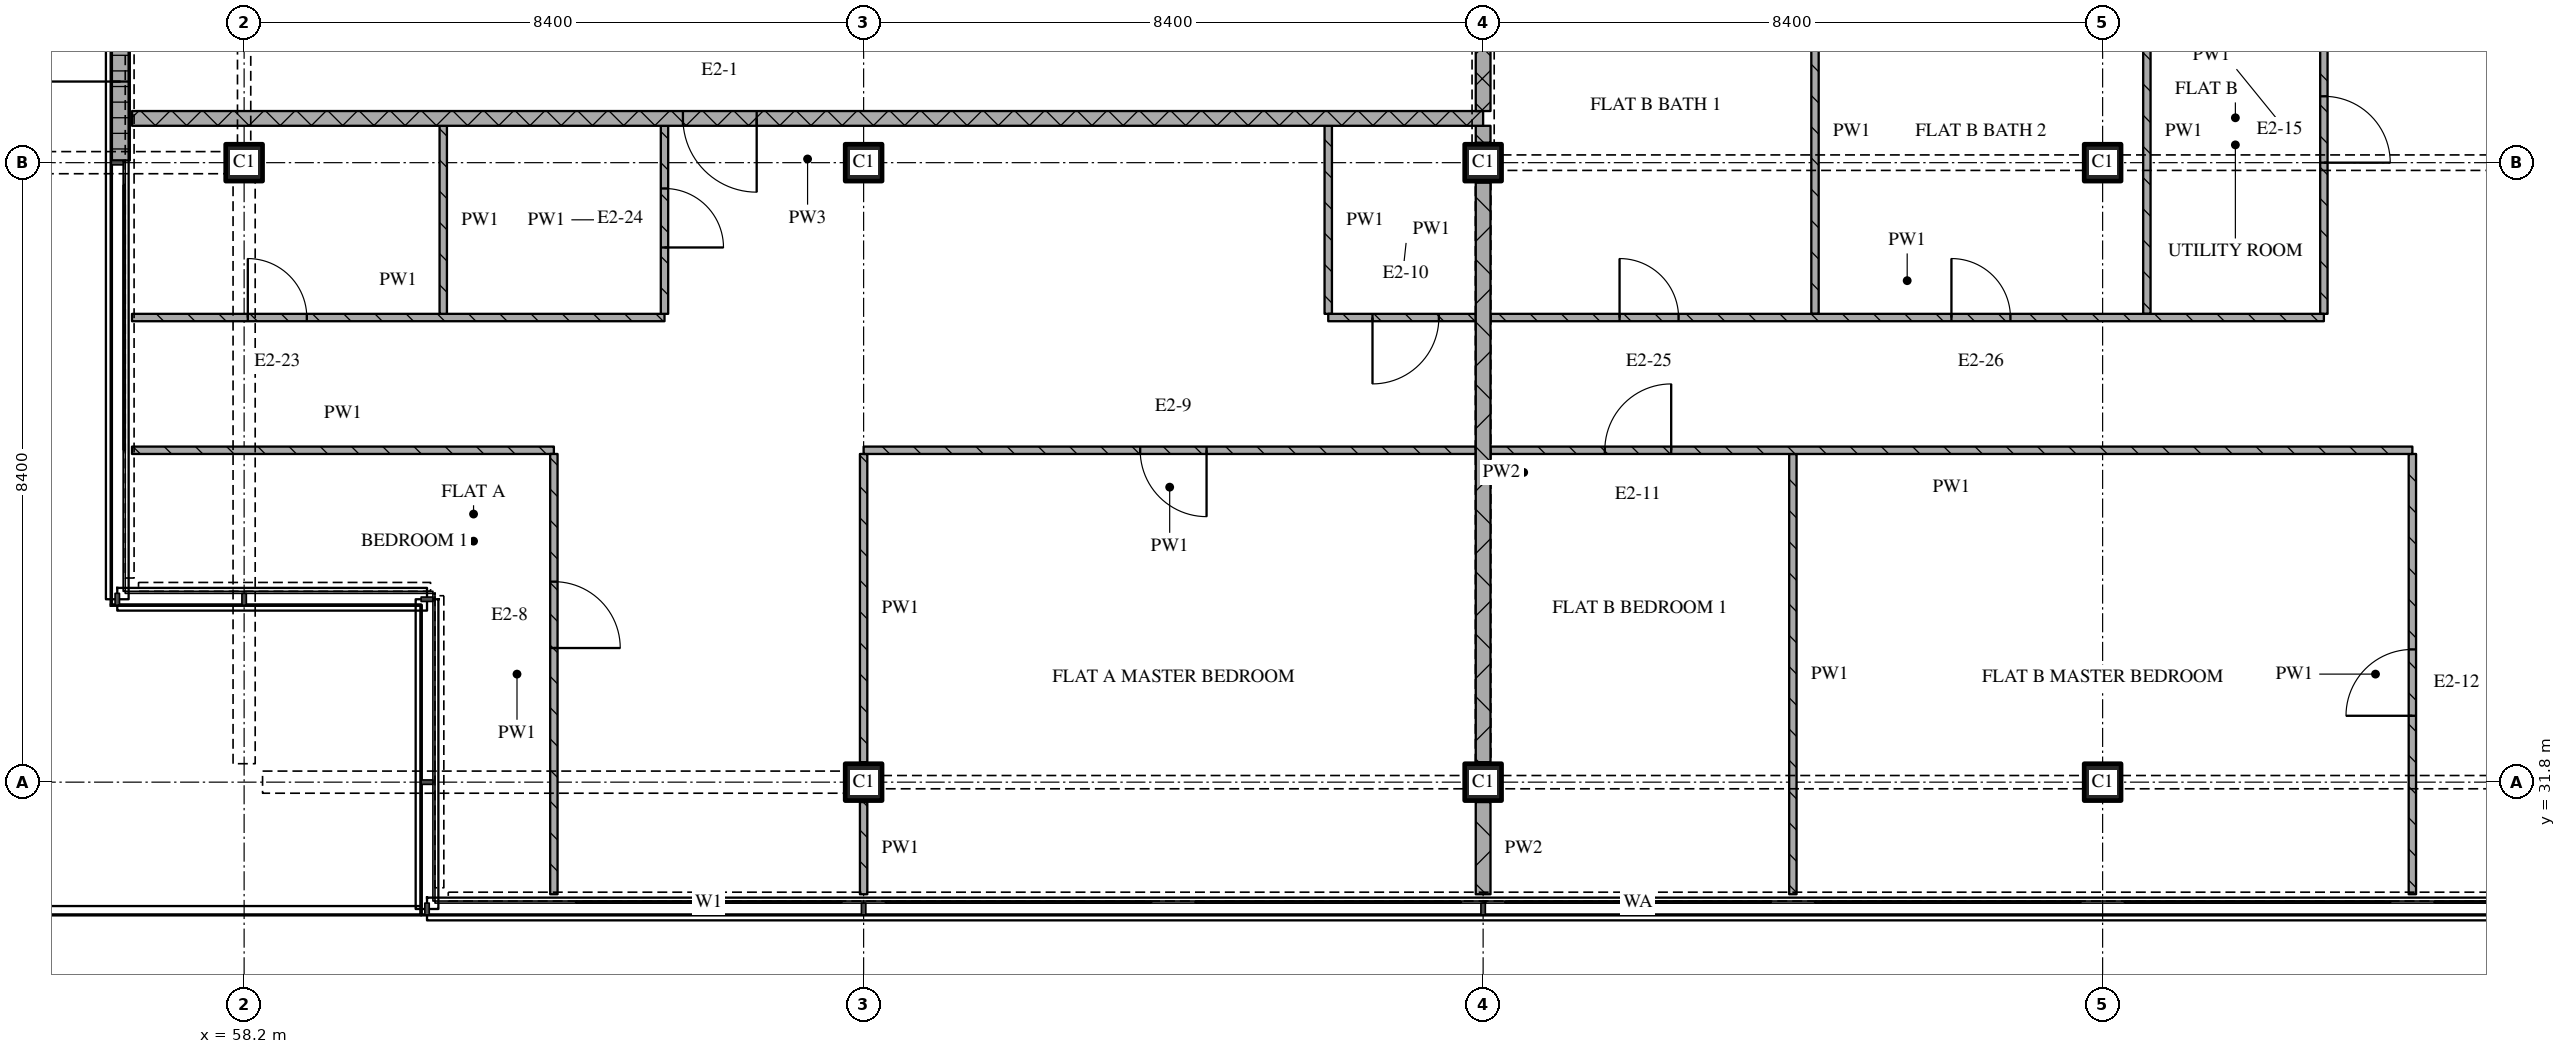
"""IFC4 building model, lengths in metres.
Left out: names, types, materials, properties, quantities, classifications, styles, units other than length and angle.
Written with IfcOpenShell. Run it as: python <this file> out.ifc"""

import sys

from ifc_helpers import new_model, si_unit, direction, frame, frame_2d, origin, origin_2d, place, context, subcontext, project, spatial, rectangle, extrude, element, fill, save


model = new_model("IFC4")
c1 = context("Model", 3, precision=1e-05, world=origin(), true_north=direction((0.0, 1.0)))
c2 = subcontext(c1, "Body", "Model", "MODEL_VIEW")
j1 = project(units=[si_unit("LENGTHUNIT", "METRE"), si_unit("PLANEANGLEUNIT", "RADIAN")], contexts=[c1])
p1 = place(None, origin())
s1 = spatial("IfcSite", under=j1, at=p1, CompositionType="ELEMENT")
p2 = place(p1, origin())
s2 = spatial("IfcBuilding", under=s1, at=p2, CompositionType="ELEMENT")
p3 = place(p2, frame((0.0, 0.0, 270.75)))
s3 = spatial("IfcBuildingStorey", under=s2, at=p3, CompositionType="ELEMENT", Elevation=270.75)
for number, where, z_axis, x_axis in (
    (1, (58.2, 40.2, 0.0), (0.0, 0.0, 1.0), (1.0, 0.0, 0.0)),
    (2, (66.6, 31.8, 0.0), (0.0, 0.0, 1.0), (1.0, 0.0, 0.0)),
    (3, (66.6, 40.2, 0.0), (0.0, 0.0, 1.0), (1.0, 0.0, 0.0)),
    (4, (75.0, 31.8, 0.0), (0.0, 0.0, 1.0), (1.0, 0.0, 0.0)),
    (5, (75.0, 40.2, 0.0), (0.0, 0.0, 1.0), (1.0, 0.0, 0.0)),
    (6, (83.4, 31.8, 0.0), (0.0, 0.0, 1.0), (1.0, 0.0, 0.0)),
    (7, (83.4, 40.2, 0.0), (0.0, 0.0, 1.0), (1.0, 0.0, 0.0)),
):
    element("IfcColumn", number, at=place(p3, frame(where, z_axis=z_axis, x_axis=x_axis)), inside=s3, PredefinedType="COLUMN", context=c2, shape_type="SweptSolid", body=[
        extrude(rectangle(XDim=0.5, YDim=0.5, at=origin_2d()), origin(), (0.0, 0.0, 1.0), 3.6),
    ])
p4 = place(p3, frame((56.525, 40.23, 0.0), z_axis=(0.0, 0.0, 1.0), x_axis=(0.0, 1.0, 0.0)))
e8 = element("IfcWall", 8, at=p4, inside=s3, PredefinedType="SOLIDWALL", context=c2, shape_type="SweptSolid", body=[
    extrude(rectangle(XDim=4.14, YDim=0.25, at=frame_2d((2.07, 0.0))), origin(), (0.0, 0.0, 1.0), 3.32),
])
p5 = place(p4, frame((1.07, 0.0, 0.0)))
e9 = element("IfcOpeningElement", 9, at=p5, cuts=e8, PredefinedType="OPENING", context=c2, shape_type="SweptSolid", body=[
    extrude(rectangle(XDim=2.0, YDim=2.4, at=frame_2d((1.0, 1.2))), frame((0.0, 0.135, 0.0), z_axis=(0.0, -1.0, 0.0), x_axis=(1.0, 0.0, 0.0)), (0.0, 0.0, 1.0), 0.27),
])
p6 = place(p3, frame((56.68, 36.3, 0.0), z_axis=(0.0, 0.0, 1.0), x_axis=(1.0, 0.0, 0.0)))
e10 = element("IfcWall", 10, at=p6, inside=s3, PredefinedType="PARTITIONING", context=c2, shape_type="SweptSolid", body=[
    extrude(rectangle(XDim=5.72, YDim=0.1, at=frame_2d((2.86, 0.0))), origin(), (0.0, 0.0, 1.0), 3.32),
])
p7 = place(p3, frame((56.68, 38.1, 0.0), z_axis=(0.0, 0.0, 1.0), x_axis=(1.0, 0.0, 0.0)))
e11 = element("IfcWall", 11, at=p7, inside=s3, PredefinedType="PARTITIONING", context=c2, shape_type="SweptSolid", body=[
    extrude(rectangle(XDim=7.22, YDim=0.1, at=frame_2d((3.61, 0.0))), origin(), (0.0, 0.0, 1.0), 3.32),
])
p8 = place(p7, frame((1.57, 0.0, 0.0)))
e12 = element("IfcOpeningElement", 12, at=p8, cuts=e11, PredefinedType="OPENING", context=c2, shape_type="SweptSolid", body=[
    extrude(rectangle(XDim=0.8, YDim=2.1, at=frame_2d((0.4, 1.05))), frame((0.0, 0.06, 0.0), z_axis=(0.0, -1.0, 0.0), x_axis=(1.0, 0.0, 0.0)), (0.0, 0.0, 1.0), 0.12),
])
p9 = place(p3, frame((75.0, 40.8, 0.0), z_axis=(0.0, 0.0, 1.0), x_axis=(-1.0, 0.0, 0.0)))
e13 = element("IfcWall", 13, at=p9, inside=s3, PredefinedType="PARTITIONING", context=c2, shape_type="SweptSolid", body=[
    extrude(rectangle(XDim=18.32, YDim=0.2, at=frame_2d((9.16, 0.0))), origin(), (0.0, 0.0, 1.0), 3.32),
])
p10 = place(p9, frame((9.85, 0.0, 0.0)))
e14 = element("IfcOpeningElement", 14, at=p10, cuts=e13, PredefinedType="OPENING", context=c2, shape_type="SweptSolid", body=[
    extrude(rectangle(XDim=1.0, YDim=2.1, at=frame_2d((0.5, 1.05))), frame((0.0, 0.11, 0.0), z_axis=(0.0, -1.0, 0.0), x_axis=(1.0, 0.0, 0.0)), (0.0, 0.0, 1.0), 0.22),
])
p11 = place(p3, frame((60.9, 40.7, 0.0), z_axis=(0.0, 0.0, 1.0), x_axis=(0.0, -1.0, 0.0)))
e15 = element("IfcWall", 15, at=p11, inside=s3, PredefinedType="PARTITIONING", context=c2, shape_type="SweptSolid", body=[
    extrude(rectangle(XDim=2.55, YDim=0.1, at=frame_2d((1.275, 0.0))), origin(), (0.0, 0.0, 1.0), 3.32),
])
p12 = place(p3, frame((62.4, 30.28, 0.0), z_axis=(0.0, 0.0, 1.0), x_axis=(0.0, 1.0, 0.0)))
e16 = element("IfcWall", 16, at=p12, inside=s3, PredefinedType="PARTITIONING", context=c2, shape_type="SweptSolid", body=[
    extrude(rectangle(XDim=5.97, YDim=0.1, at=frame_2d((2.985, 0.0))), origin(), (0.0, 0.0, 1.0), 3.32),
])
p13 = place(p12, frame((3.339, 0.0, 0.0)))
e17 = element("IfcOpeningElement", 17, at=p13, cuts=e16, PredefinedType="OPENING", context=c2, shape_type="SweptSolid", body=[
    extrude(rectangle(XDim=0.9, YDim=2.1, at=frame_2d((0.45, 1.05))), frame((0.0, 0.06, 0.0), z_axis=(0.0, -1.0, 0.0), x_axis=(1.0, 0.0, 0.0)), (0.0, 0.0, 1.0), 0.12),
])
p14 = place(p3, frame((63.9, 38.15, 0.0), z_axis=(0.0, 0.0, 1.0), x_axis=(0.0, 1.0, 0.0)))
e18 = element("IfcWall", 18, at=p14, inside=s3, PredefinedType="PARTITIONING", context=c2, shape_type="SweptSolid", body=[
    extrude(rectangle(XDim=2.55, YDim=0.1, at=frame_2d((1.275, 0.0))), origin(), (0.0, 0.0, 1.0), 3.32),
])
p15 = place(p14, frame((0.9, 0.0, 0.0)))
e19 = element("IfcOpeningElement", 19, at=p15, cuts=e18, PredefinedType="OPENING", context=c2, shape_type="SweptSolid", body=[
    extrude(rectangle(XDim=0.8, YDim=2.1, at=frame_2d((0.4, 1.05))), frame((0.0, 0.06, 0.0), z_axis=(0.0, -1.0, 0.0), x_axis=(1.0, 0.0, 0.0)), (0.0, 0.0, 1.0), 0.12),
])
p16 = place(p3, frame((66.6, 31.53, 0.0), z_axis=(0.0, 0.0, 1.0), x_axis=(0.0, -1.0, 0.0)))
e20 = element("IfcWall", 20, at=p16, inside=s3, PredefinedType="PARTITIONING", context=c2, shape_type="SweptSolid", body=[
    extrude(rectangle(XDim=1.25, YDim=0.1, at=frame_2d((0.625, 0.0))), origin(), (0.0, 0.0, 1.0), 3.32),
])
p17 = place(p3, frame((66.6, 36.25, 0.0), z_axis=(0.0, 0.0, 1.0), x_axis=(0.0, -1.0, 0.0)))
e21 = element("IfcWall", 21, at=p17, inside=s3, PredefinedType="PARTITIONING", context=c2, shape_type="SweptSolid", body=[
    extrude(rectangle(XDim=4.18, YDim=0.1, at=frame_2d((2.09, 0.0))), origin(), (0.0, 0.0, 1.0), 3.32),
])
p18 = place(p3, frame((72.9, 40.7, 0.0), z_axis=(0.0, 0.0, 1.0), x_axis=(0.0, -1.0, 0.0)))
e22 = element("IfcWall", 22, at=p18, inside=s3, PredefinedType="PARTITIONING", context=c2, shape_type="SweptSolid", body=[
    extrude(rectangle(XDim=2.55, YDim=0.1, at=frame_2d((1.275, 0.0))), origin(), (0.0, 0.0, 1.0), 3.32),
])
p19 = place(p3, frame((75.0, 43.1, 0.0), z_axis=(0.0, 0.0, 1.0), x_axis=(0.0, -1.0, 0.0)))
e23 = element("IfcWall", 23, at=p19, inside=s3, PredefinedType="PARTITIONING", context=c2, shape_type="SweptSolid", body=[
    extrude(rectangle(XDim=2.2, YDim=0.2, at=frame_2d((1.1, 0.0))), origin(), (0.0, 0.0, 1.0), 2.53),
])
p20 = place(p3, frame((75.0, 31.53, 0.0), z_axis=(0.0, 0.0, 1.0), x_axis=(0.0, -1.0, 0.0)))
e24 = element("IfcWall", 24, at=p20, inside=s3, PredefinedType="PARTITIONING", context=c2, shape_type="SweptSolid", body=[
    extrude(rectangle(XDim=1.25, YDim=0.2, at=frame_2d((0.625, 0.0))), origin(), (0.0, 0.0, 1.0), 3.32),
])
p21 = place(p3, frame((75.0, 39.93, 0.0), z_axis=(0.0, 0.0, 1.0), x_axis=(0.0, -1.0, 0.0)))
e25 = element("IfcWall", 25, at=p21, inside=s3, PredefinedType="PARTITIONING", context=c2, shape_type="SweptSolid", body=[
    extrude(rectangle(XDim=7.86, YDim=0.2, at=frame_2d((3.93, 0.0))), origin(), (0.0, 0.0, 1.0), 2.77),
])
p22 = place(p3, frame((75.0, 40.7, 0.0), z_axis=(0.0, 0.0, 1.0), x_axis=(0.0, -1.0, 0.0)))
e26 = element("IfcWall", 26, at=p22, inside=s3, PredefinedType="PARTITIONING", context=c2, shape_type="SweptSolid", body=[
    extrude(rectangle(XDim=0.23, YDim=0.2, at=frame_2d((0.115, 0.0))), origin(), (0.0, 0.0, 1.0), 3.32),
])
p23 = place(p3, frame((79.2, 36.25, 0.0), z_axis=(0.0, 0.0, 1.0), x_axis=(0.0, -1.0, 0.0)))
e27 = element("IfcWall", 27, at=p23, inside=s3, PredefinedType="PARTITIONING", context=c2, shape_type="SweptSolid", body=[
    extrude(rectangle(XDim=5.97, YDim=0.1, at=frame_2d((2.985, 0.0))), origin(), (0.0, 0.0, 1.0), 3.32),
])
for number, where, z_axis, x_axis in (
    (28, (79.5, 43.1, 0.0), (0.0, 0.0, 1.0), (0.0, -1.0, 0.0)),
    (29, (84.0, 43.1, 0.0), (0.0, 0.0, 1.0), (0.0, -1.0, 0.0)),
):
    element("IfcWall", number, at=place(p3, frame(where, z_axis=z_axis, x_axis=x_axis)), inside=s3, PredefinedType="PARTITIONING", context=c2, shape_type="SweptSolid", body=[
        extrude(rectangle(XDim=4.95, YDim=0.1, at=frame_2d((2.475, 0.0))), origin(), (0.0, 0.0, 1.0), 3.32),
    ])
p24 = place(p3, frame((86.4, 38.15, 0.0), z_axis=(0.0, 0.0, 1.0), x_axis=(0.0, 1.0, 0.0)))
e30 = element("IfcWall", 30, at=p24, inside=s3, PredefinedType="PARTITIONING", context=c2, shape_type="SweptSolid", body=[
    extrude(rectangle(XDim=4.95, YDim=0.1, at=frame_2d((2.475, 0.0))), origin(), (0.0, 0.0, 1.0), 3.32),
])
p25 = place(p24, frame((2.05, 0.0, 0.0)))
e31 = element("IfcOpeningElement", 31, at=p25, cuts=e30, PredefinedType="OPENING", context=c2, shape_type="SweptSolid", body=[
    extrude(rectangle(XDim=0.9, YDim=2.1, at=frame_2d((0.45, 1.05))), frame((0.0, 0.06, 0.0), z_axis=(0.0, -1.0, 0.0), x_axis=(1.0, 0.0, 0.0)), (0.0, 0.0, 1.0), 0.12),
])
p26 = place(p3, frame((87.6, 30.28, 0.0), z_axis=(0.0, 0.0, 1.0), x_axis=(0.0, 1.0, 0.0)))
e32 = element("IfcWall", 32, at=p26, inside=s3, PredefinedType="PARTITIONING", context=c2, shape_type="SweptSolid", body=[
    extrude(rectangle(XDim=5.97, YDim=0.1, at=frame_2d((2.985, 0.0))), origin(), (0.0, 0.0, 1.0), 3.32),
])
p27 = place(p26, frame((2.42, 0.0, 0.0)))
e33 = element("IfcOpeningElement", 33, at=p27, cuts=e32, PredefinedType="OPENING", context=c2, shape_type="SweptSolid", body=[
    extrude(rectangle(XDim=0.9, YDim=2.1, at=frame_2d((0.45, 1.05))), frame((0.0, 0.06, 0.0), z_axis=(0.0, -1.0, 0.0), x_axis=(1.0, 0.0, 0.0)), (0.0, 0.0, 1.0), 0.12),
])
p28 = place(p3, frame((74.9, 36.3, 0.0), z_axis=(0.0, 0.0, 1.0), x_axis=(-1.0, 0.0, 0.0)))
e34 = element("IfcWall", 34, at=p28, inside=s3, PredefinedType="PARTITIONING", context=c2, shape_type="SweptSolid", body=[
    extrude(rectangle(XDim=8.3, YDim=0.1, at=frame_2d((4.15, 0.0))), origin(), (0.0, 0.0, 1.0), 3.32),
])
p29 = place(p28, frame((3.65, 0.0, 0.0)))
e35 = element("IfcOpeningElement", 35, at=p29, cuts=e34, PredefinedType="OPENING", context=c2, shape_type="SweptSolid", body=[
    extrude(rectangle(XDim=0.9, YDim=2.1, at=frame_2d((0.45, 1.05))), frame((0.0, 0.06, 0.0), z_axis=(0.0, -1.0, 0.0), x_axis=(1.0, 0.0, 0.0)), (0.0, 0.0, 1.0), 0.12),
])
p30 = place(p3, frame((87.6, 36.3, 0.0), z_axis=(0.0, 0.0, 1.0), x_axis=(-1.0, 0.0, 0.0)))
e36 = element("IfcWall", 36, at=p30, inside=s3, PredefinedType="PARTITIONING", context=c2, shape_type="SweptSolid", body=[
    extrude(rectangle(XDim=12.5, YDim=0.1, at=frame_2d((6.25, 0.0))), origin(), (0.0, 0.0, 1.0), 3.32),
])
p31 = place(p30, frame((10.05, 0.0, 0.0)))
e37 = element("IfcOpeningElement", 37, at=p31, cuts=e36, PredefinedType="OPENING", context=c2, shape_type="SweptSolid", body=[
    extrude(rectangle(XDim=0.9, YDim=2.1, at=frame_2d((0.45, 1.05))), frame((0.0, 0.06, 0.0), z_axis=(0.0, -1.0, 0.0), x_axis=(1.0, 0.0, 0.0)), (0.0, 0.0, 1.0), 0.12),
])
p32 = place(p3, frame((72.9, 38.1, 0.0), z_axis=(0.0, 0.0, 1.0), x_axis=(1.0, 0.0, 0.0)))
e38 = element("IfcWall", 38, at=p32, inside=s3, PredefinedType="PARTITIONING", context=c2, shape_type="SweptSolid", body=[
    extrude(rectangle(XDim=2.0, YDim=0.1, at=frame_2d((1.0, 0.0))), origin(), (0.0, 0.0, 1.0), 3.32),
])
p33 = place(p32, frame((0.6, 0.0, 0.0)))
e39 = element("IfcOpeningElement", 39, at=p33, cuts=e38, PredefinedType="OPENING", context=c2, shape_type="SweptSolid", body=[
    extrude(rectangle(XDim=0.9, YDim=2.1, at=frame_2d((0.45, 1.05))), frame((0.0, 0.06, 0.0), z_axis=(0.0, -1.0, 0.0), x_axis=(1.0, 0.0, 0.0)), (0.0, 0.0, 1.0), 0.12),
])
p34 = place(p3, frame((75.1, 38.1, 0.0), z_axis=(0.0, 0.0, 1.0), x_axis=(1.0, 0.0, 0.0)))
e40 = element("IfcWall", 40, at=p34, inside=s3, PredefinedType="PARTITIONING", context=c2, shape_type="SweptSolid", body=[
    extrude(rectangle(XDim=11.3, YDim=0.1, at=frame_2d((5.65, 0.0))), origin(), (0.0, 0.0, 1.0), 3.32),
])
p35 = place(p34, frame((1.75, 0.0, 0.0)))
e41 = element("IfcOpeningElement", 41, at=p35, cuts=e40, PredefinedType="OPENING", context=c2, shape_type="SweptSolid", body=[
    extrude(rectangle(XDim=0.8, YDim=2.1, at=frame_2d((0.4, 1.05))), frame((0.0, 0.06, 0.0), z_axis=(0.0, -1.0, 0.0), x_axis=(1.0, 0.0, 0.0)), (0.0, 0.0, 1.0), 0.12),
])
p36 = place(p34, frame((6.25, 0.0, 0.0)))
e42 = element("IfcOpeningElement", 42, at=p36, cuts=e40, PredefinedType="OPENING", context=c2, shape_type="SweptSolid", body=[
    extrude(rectangle(XDim=0.8, YDim=2.1, at=frame_2d((0.4, 1.05))), frame((0.0, 0.06, 0.0), z_axis=(0.0, -1.0, 0.0), x_axis=(1.0, 0.0, 0.0)), (0.0, 0.0, 1.0), 0.12),
])
p37 = place(p5, origin())
e43 = element("IfcDoor", 43, at=p37, inside=s3, OperationType="DOUBLE_DOOR_SINGLE_SWING", PredefinedType="DOOR", context=c2, shape_type="SweptSolid", body=[
    extrude(rectangle(XDim=2.0, YDim=2.4, at=frame_2d((1.0, 1.2))), frame((0.0, 0.025, 0.0), z_axis=(0.0, -1.0, 0.0), x_axis=(1.0, 0.0, 0.0)), (0.0, 0.0, 1.0), 0.05),
])
fill(e9, e43)
p38 = place(p8, origin())
e44 = element("IfcDoor", 44, at=p38, inside=s3, OperationType="SINGLE_SWING_LEFT", PredefinedType="DOOR", context=c2, shape_type="SweptSolid", body=[
    extrude(rectangle(XDim=0.8, YDim=2.1, at=frame_2d((0.4, 1.05))), frame((0.0, 0.025, 0.0), z_axis=(0.0, -1.0, 0.0), x_axis=(1.0, 0.0, 0.0)), (0.0, 0.0, 1.0), 0.05),
])
fill(e12, e44)
p39 = place(p10, origin())
e45 = element("IfcDoor", 45, at=p39, inside=s3, OperationType="SINGLE_SWING_LEFT", PredefinedType="DOOR", context=c2, shape_type="SweptSolid", body=[
    extrude(rectangle(XDim=1.0, YDim=2.1, at=frame_2d((0.5, 1.05))), frame((0.0, 0.025, 0.0), z_axis=(0.0, -1.0, 0.0), x_axis=(1.0, 0.0, 0.0)), (0.0, 0.0, 1.0), 0.05),
])
fill(e14, e45)
p40 = place(p13, origin())
e46 = element("IfcDoor", 46, at=p40, inside=s3, OperationType="SINGLE_SWING_RIGHT", PredefinedType="DOOR", context=c2, shape_type="SweptSolid", body=[
    extrude(rectangle(XDim=0.9, YDim=2.1, at=frame_2d((0.45, 1.05))), frame((0.0, 0.025, 0.0), z_axis=(0.0, -1.0, 0.0), x_axis=(1.0, 0.0, 0.0)), (0.0, 0.0, 1.0), 0.05),
])
fill(e17, e46)
p41 = place(p15, origin())
e47 = element("IfcDoor", 47, at=p41, inside=s3, OperationType="SINGLE_SWING_RIGHT", PredefinedType="DOOR", context=c2, shape_type="SweptSolid", body=[
    extrude(rectangle(XDim=0.8, YDim=2.1, at=frame_2d((0.4, 1.05))), frame((0.0, 0.025, 0.0), z_axis=(0.0, -1.0, 0.0), x_axis=(1.0, 0.0, 0.0)), (0.0, 0.0, 1.0), 0.05),
])
fill(e19, e47)
p42 = place(p25, origin())
e48 = element("IfcDoor", 48, at=p42, inside=s3, OperationType="SINGLE_SWING_RIGHT", PredefinedType="DOOR", context=c2, shape_type="SweptSolid", body=[
    extrude(rectangle(XDim=0.9, YDim=2.1, at=frame_2d((0.45, 1.05))), frame((0.0, 0.025, 0.0), z_axis=(0.0, -1.0, 0.0), x_axis=(1.0, 0.0, 0.0)), (0.0, 0.0, 1.0), 0.05),
])
fill(e31, e48)
p43 = place(p27, origin())
e49 = element("IfcDoor", 49, at=p43, inside=s3, OperationType="SINGLE_SWING_LEFT", PredefinedType="DOOR", context=c2, shape_type="SweptSolid", body=[
    extrude(rectangle(XDim=0.9, YDim=2.1, at=frame_2d((0.45, 1.05))), frame((0.0, 0.025, 0.0), z_axis=(0.0, -1.0, 0.0), x_axis=(1.0, 0.0, 0.0)), (0.0, 0.0, 1.0), 0.05),
])
fill(e33, e49)
p44 = place(p29, origin())
e50 = element("IfcDoor", 50, at=p44, inside=s3, OperationType="SINGLE_SWING_LEFT", PredefinedType="DOOR", context=c2, shape_type="SweptSolid", body=[
    extrude(rectangle(XDim=0.9, YDim=2.1, at=frame_2d((0.45, 1.05))), frame((0.0, 0.025, 0.0), z_axis=(0.0, -1.0, 0.0), x_axis=(1.0, 0.0, 0.0)), (0.0, 0.0, 1.0), 0.05),
])
fill(e35, e50)
p45 = place(p31, origin())
e51 = element("IfcDoor", 51, at=p45, inside=s3, OperationType="SINGLE_SWING_RIGHT", PredefinedType="DOOR", context=c2, shape_type="SweptSolid", body=[
    extrude(rectangle(XDim=0.9, YDim=2.1, at=frame_2d((0.45, 1.05))), frame((0.0, 0.025, 0.0), z_axis=(0.0, -1.0, 0.0), x_axis=(1.0, 0.0, 0.0)), (0.0, 0.0, 1.0), 0.05),
])
fill(e37, e51)
p46 = place(p33, origin())
e52 = element("IfcDoor", 52, at=p46, inside=s3, OperationType="SINGLE_SWING_RIGHT", PredefinedType="DOOR", context=c2, shape_type="SweptSolid", body=[
    extrude(rectangle(XDim=0.9, YDim=2.1, at=frame_2d((0.45, 1.05))), frame((0.0, 0.025, 0.0), z_axis=(0.0, -1.0, 0.0), x_axis=(1.0, 0.0, 0.0)), (0.0, 0.0, 1.0), 0.05),
])
fill(e39, e52)
p47 = place(p35, origin())
e53 = element("IfcDoor", 53, at=p47, inside=s3, OperationType="SINGLE_SWING_LEFT", PredefinedType="DOOR", context=c2, shape_type="SweptSolid", body=[
    extrude(rectangle(XDim=0.8, YDim=2.1, at=frame_2d((0.4, 1.05))), frame((0.0, 0.025, 0.0), z_axis=(0.0, -1.0, 0.0), x_axis=(1.0, 0.0, 0.0)), (0.0, 0.0, 1.0), 0.05),
])
fill(e41, e53)
p48 = place(p36, origin())
e54 = element("IfcDoor", 54, at=p48, inside=s3, OperationType="SINGLE_SWING_LEFT", PredefinedType="DOOR", context=c2, shape_type="SweptSolid", body=[
    extrude(rectangle(XDim=0.8, YDim=2.1, at=frame_2d((0.4, 1.05))), frame((0.0, 0.025, 0.0), z_axis=(0.0, -1.0, 0.0), x_axis=(1.0, 0.0, 0.0)), (0.0, 0.0, 1.0), 0.05),
])
fill(e42, e54)
save(model, sys.argv[1])
